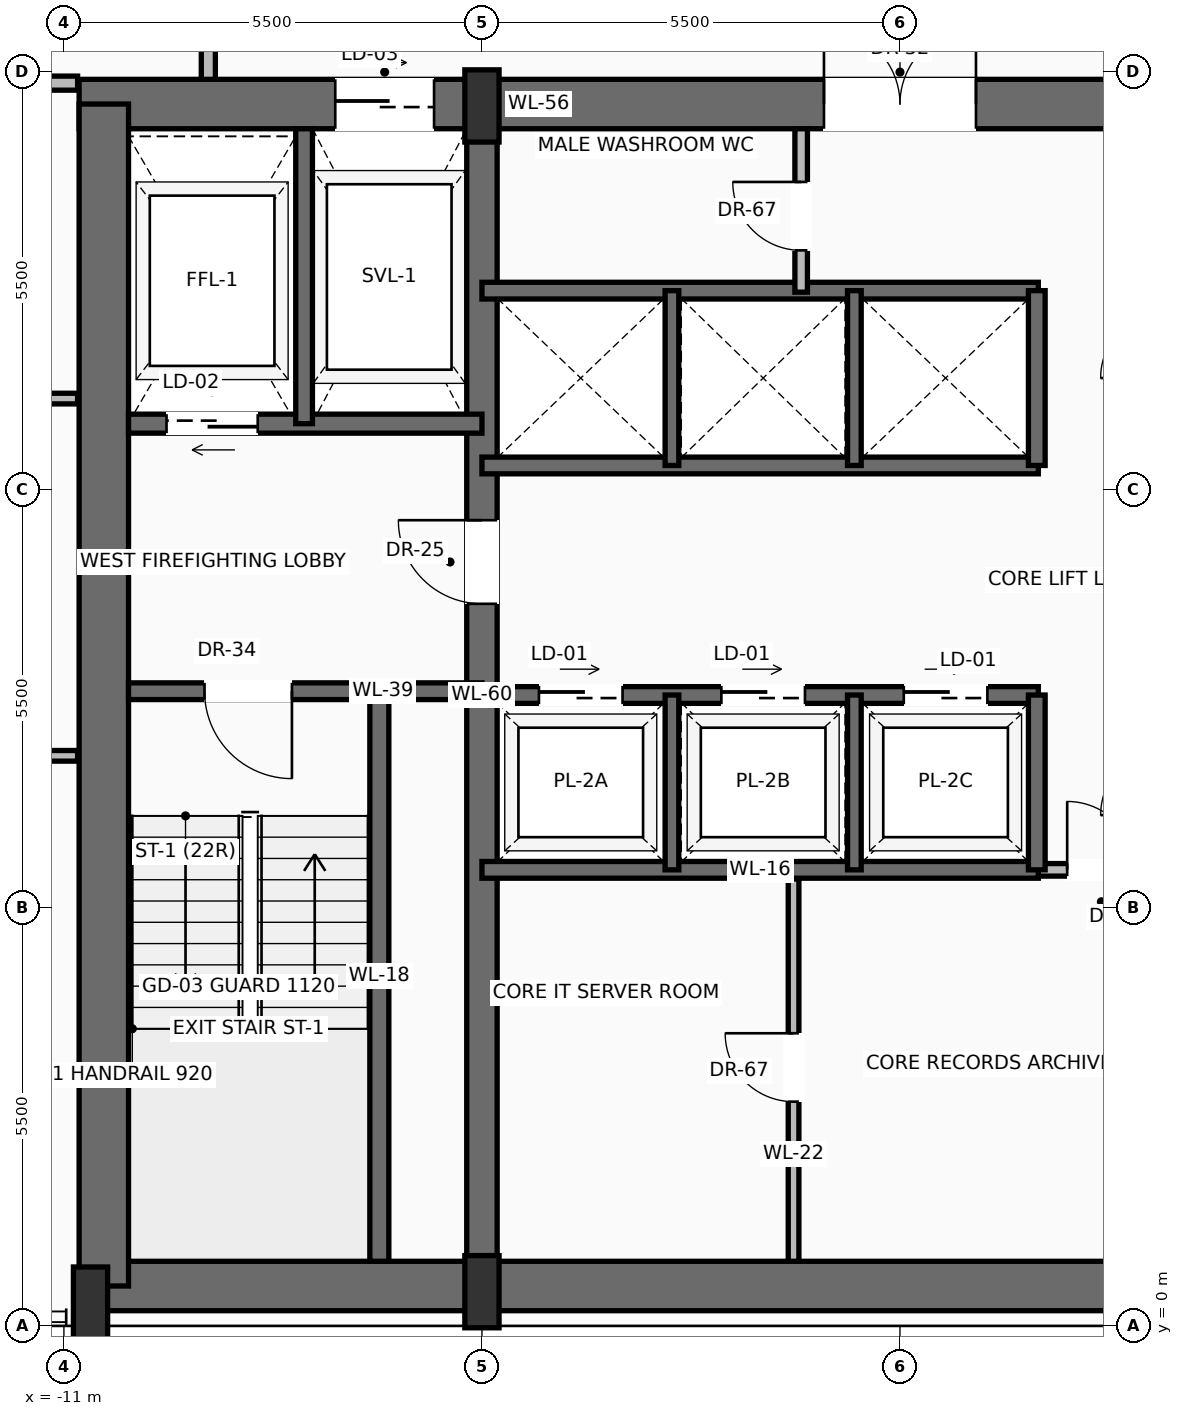
"""IFC4 building model, lengths in metres.
Left out: names, types, materials, properties, quantities, classifications, styles, units other than length and angle.
Written with IfcOpenShell. Run it as: python <this file> out.ifc"""

import sys

from ifc_helpers import new_model, si_unit, direction, frame, frame_2d, origin, origin_2d, place, context, subcontext, project, spatial, rectangle, extrude, source, transform, mapped, element, fill, save


model = new_model("IFC4")
c1 = context("Model", 3, precision=1e-05, world=origin(), true_north=direction((0.0, 1.0)))
c2 = subcontext(c1, "Body", "Model", "MODEL_VIEW")
j1 = project(units=[si_unit("LENGTHUNIT", "METRE"), si_unit("PLANEANGLEUNIT", "RADIAN")], contexts=[c1])
p1 = place(None, origin())
s1 = spatial("IfcSite", under=j1, at=p1, CompositionType="ELEMENT")
p2 = place(p1, origin())
s2 = spatial("IfcBuilding", under=s1, at=p2, CompositionType="ELEMENT")
p3 = place(p2, frame((0.0, 0.0, 151.5)))
s3 = spatial("IfcBuildingStorey", under=s2, at=p3, CompositionType="ELEMENT", Elevation=151.5)
p4 = place(p3, frame((-10.65, 0.525, 0.0), z_axis=(0.0, 0.0, 1.0), x_axis=(1.0, 0.0, 0.0)))
e1 = element("IfcWall", 1, at=p4, inside=s3, PredefinedType="SHEAR", context=c2, shape_type="SweptSolid", body=[
    extrude(rectangle(XDim=21.3, YDim=0.65, at=frame_2d((10.65, 0.0))), origin(), (0.0, 0.0, 1.0), 3.47),
])
p5 = place(p3, frame((-10.8, 16.075, 0.0), z_axis=(0.0, 0.0, 1.0), x_axis=(1.0, 0.0, 0.0)))
e2 = element("IfcWall", 2, at=p5, inside=s3, PredefinedType="SHEAR", context=c2, shape_type="SweptSolid", body=[
    extrude(rectangle(XDim=21.6, YDim=0.65, at=frame_2d((10.8, 0.0))), origin(), (0.0, 0.0, 1.0), 3.47),
])
p6 = place(p5, frame((3.37, 0.0, 0.0)))
e3 = element("IfcOpeningElement", 3, at=p6, cuts=e2, PredefinedType="OPENING", context=c2, shape_type="SweptSolid", body=[
    extrude(rectangle(XDim=1.3, YDim=2.3, at=frame_2d((0.65, 1.15))), frame((0.0, 0.335, 0.0), z_axis=(0.0, -1.0, 0.0), x_axis=(1.0, 0.0, 0.0)), (0.0, 0.0, 1.0), 0.67),
])
p7 = place(p5, frame((9.8, 0.0, 0.0)))
e4 = element("IfcOpeningElement", 4, at=p7, cuts=e2, PredefinedType="OPENING", context=c2, shape_type="SweptSolid", body=[
    extrude(rectangle(XDim=2.0, YDim=2.4, at=frame_2d((1.0, 1.2))), frame((0.0, 0.335, 0.0), z_axis=(0.0, -1.0, 0.0), x_axis=(1.0, 0.0, 0.0)), (0.0, 0.0, 1.0), 0.67),
])
p8 = place(p3, frame((-10.475, 0.525, 0.0), z_axis=(0.0, 0.0, 1.0), x_axis=(0.0, 1.0, 0.0)))
e5 = element("IfcWall", 5, at=p8, inside=s3, PredefinedType="SHEAR", context=c2, shape_type="SweptSolid", body=[
    extrude(rectangle(XDim=15.55, YDim=0.65, at=frame_2d((7.775, 0.0))), origin(), (0.0, 0.0, 1.0), 3.47),
])
p9 = place(p3, frame((-5.5, 0.525, 0.0), z_axis=(0.0, 0.0, 1.0), x_axis=(0.0, 1.0, 0.0)))
e6 = element("IfcWall", 6, at=p9, inside=s3, PredefinedType="SHEAR", context=c2, shape_type="SweptSolid", body=[
    extrude(rectangle(XDim=15.55, YDim=0.4, at=frame_2d((7.775, 0.0))), origin(), (0.0, 0.0, 1.0), 3.47),
])
p10 = place(p9, frame((8.975, 0.0, 0.0)))
e7 = element("IfcOpeningElement", 7, at=p10, cuts=e6, PredefinedType="OPENING", context=c2, shape_type="SweptSolid", body=[
    extrude(rectangle(XDim=1.1, YDim=2.2, at=frame_2d((0.55, 1.1))), frame((0.0, 0.21, 0.0), z_axis=(0.0, -1.0, 0.0), x_axis=(1.0, 0.0, 0.0)), (0.0, 0.0, 1.0), 0.42),
])
m1 = source(origin(), c2, "Body", "SweptSolid", [
    extrude(rectangle(XDim=0.45, YDim=0.95, at=origin_2d()), origin(), (0.0, 0.0, 1.0), 3.7),
])
for number, where, z_axis, x_axis in (
    (8, (-10.65, 0.3, 0.0), (0.0, 0.0, 1.0), (1.0, 0.0, 0.0)),
    (9, (-5.5, 0.45, 0.0), (0.0, 0.0, 1.0), (1.0, 0.0, 0.0)),
    (10, (-5.5, 16.05, 0.0), (0.0, 0.0, 1.0), (1.0, 0.0, 0.0)),
):
    element("IfcColumn", number, at=place(p3, frame(where, z_axis=z_axis, x_axis=x_axis)), inside=s3, PredefinedType="PILASTER", context=c2, shape_type="MappedRepresentation", body=[
        mapped(m1, transform((0.0, 0.0, 0.0), scale=1.0)),
    ])
p11 = place(p3, frame((-6.85, 0.85, 0.0), z_axis=(0.0, 0.0, 1.0), x_axis=(0.0, 1.0, 0.0)))
e11 = element("IfcWall", 11, at=p11, inside=s3, PredefinedType="SOLIDWALL", context=c2, shape_type="SweptSolid", body=[
    extrude(rectangle(XDim=7.5, YDim=0.25, at=frame_2d((3.75, 0.0))), origin(), (0.0, 0.0, 1.0), 3.47),
])
p12 = place(p3, frame((-5.5, 8.35, 0.0), z_axis=(0.0, 0.0, 1.0), x_axis=(-1.0, 0.0, 0.0)))
e12 = element("IfcWall", 12, at=p12, inside=s3, PredefinedType="SOLIDWALL", context=c2, shape_type="SweptSolid", body=[
    extrude(rectangle(XDim=4.65, YDim=0.22, at=frame_2d((2.325, 0.0))), origin(), (0.0, 0.0, 1.0), 3.47),
])
p13 = place(p12, frame((2.5, 0.0, 0.0)))
e13 = element("IfcOpeningElement", 13, at=p13, cuts=e12, PredefinedType="OPENING", context=c2, shape_type="SweptSolid", body=[
    extrude(rectangle(XDim=1.15, YDim=2.2, at=frame_2d((0.575, 1.1))), frame((0.0, 0.12, 0.0), z_axis=(0.0, -1.0, 0.0), x_axis=(1.0, 0.0, 0.0)), (0.0, 0.0, 1.0), 0.24),
])
p14 = place(p3, frame((-5.5, 11.87, 0.0), z_axis=(0.0, 0.0, 1.0), x_axis=(-1.0, 0.0, 0.0)))
e14 = element("IfcWall", 14, at=p14, inside=s3, PredefinedType="SOLIDWALL", context=c2, shape_type="SweptSolid", body=[
    extrude(rectangle(XDim=4.65, YDim=0.25, at=frame_2d((2.325, 0.0))), origin(), (0.0, 0.0, 1.0), 3.47),
])
p15 = place(p14, frame((2.95, 0.0, 0.0)))
e15 = element("IfcOpeningElement", 15, at=p15, cuts=e14, PredefinedType="OPENING", context=c2, shape_type="SweptSolid", body=[
    extrude(rectangle(XDim=1.2, YDim=2.25, at=frame_2d((0.6, 1.125))), frame((0.0, 0.135, 0.0), z_axis=(0.0, -1.0, 0.0), x_axis=(1.0, 0.0, 0.0)), (0.0, 0.0, 1.0), 0.27),
])
p16 = place(p3, frame((-7.84, 11.87, 0.0), z_axis=(0.0, 0.0, 1.0), x_axis=(0.0, 1.0, 0.0)))
e16 = element("IfcWall", 16, at=p16, inside=s3, PredefinedType="SOLIDWALL", context=c2, shape_type="SweptSolid", body=[
    extrude(rectangle(XDim=3.88, YDim=0.22, at=frame_2d((1.94, 0.0))), origin(), (0.0, 0.0, 1.0), 3.47),
])
p17 = place(p3, frame((1.82, 6.0, 0.0), z_axis=(0.0, 0.0, 1.0), x_axis=(1.0, 0.0, 0.0)))
e17 = element("IfcWall", 17, at=p17, inside=s3, PredefinedType="PARTITIONING", context=c2, shape_type="SweptSolid", body=[
    extrude(rectangle(XDim=3.48, YDim=0.165, at=frame_2d((1.74, 0.0))), origin(), (0.0, 0.0, 1.0), 3.462),
])
p18 = place(p17, frame((0.38, 0.0, 0.0)))
e18 = element("IfcOpeningElement", 18, at=p18, cuts=e17, PredefinedType="OPENING", context=c2, shape_type="SweptSolid", body=[
    extrude(rectangle(XDim=0.9, YDim=2.1, at=frame_2d((0.45, 1.05))), frame((0.0, 0.093, 0.0), z_axis=(0.0, -1.0, 0.0), x_axis=(1.0, 0.0, 0.0)), (0.0, 0.0, 1.0), 0.185),
])
p19 = place(p3, frame((-1.4, 0.85, 0.0), z_axis=(0.0, 0.0, 1.0), x_axis=(0.0, 1.0, 0.0)))
e19 = element("IfcWall", 19, at=p19, inside=s3, PredefinedType="PARTITIONING", context=c2, shape_type="SweptSolid", body=[
    extrude(rectangle(XDim=5.03, YDim=0.14, at=frame_2d((2.515, 0.0))), origin(), (0.0, 0.0, 1.0), 3.462),
])
p20 = place(p19, frame((2.1, 0.0, 0.0)))
e20 = element("IfcOpeningElement", 20, at=p20, cuts=e19, PredefinedType="OPENING", context=c2, shape_type="SweptSolid", body=[
    extrude(rectangle(XDim=0.9, YDim=2.1, at=frame_2d((0.45, 1.05))), frame((0.0, 0.08, 0.0), z_axis=(0.0, -1.0, 0.0), x_axis=(1.0, 0.0, 0.0)), (0.0, 0.0, 1.0), 0.16),
])
p21 = place(p3, frame((-5.5, 6.0, 0.0), z_axis=(0.0, 0.0, 1.0), x_axis=(1.0, 0.0, 0.0)))
e21 = element("IfcWall", 21, at=p21, inside=s3, PredefinedType="SOLIDWALL", context=c2, shape_type="SweptSolid", body=[
    extrude(rectangle(XDim=7.32, YDim=0.22, at=frame_2d((3.66, 0.0))), origin(), (0.0, 0.0, 1.0), 3.47),
])
p22 = place(p3, frame((-5.5, 8.3, 0.0), z_axis=(0.0, 0.0, 1.0), x_axis=(1.0, 0.0, 0.0)))
e22 = element("IfcWall", 22, at=p22, inside=s3, PredefinedType="SOLIDWALL", context=c2, shape_type="SweptSolid", body=[
    extrude(rectangle(XDim=7.32, YDim=0.22, at=frame_2d((3.66, 0.0))), origin(), (0.0, 0.0, 1.0), 3.47),
])
p23 = place(p22, frame((0.75, 0.0, 0.0)))
e23 = element("IfcOpeningElement", 23, at=p23, cuts=e22, PredefinedType="OPENING", context=c2, shape_type="SweptSolid", body=[
    extrude(rectangle(XDim=1.1, YDim=2.2, at=frame_2d((0.55, 1.1))), frame((0.0, 0.12, 0.0), z_axis=(0.0, -1.0, 0.0), x_axis=(1.0, 0.0, 0.0)), (0.0, 0.0, 1.0), 0.24),
])
p24 = place(p22, frame((3.15, 0.0, 0.0)))
e24 = element("IfcOpeningElement", 24, at=p24, cuts=e22, PredefinedType="OPENING", context=c2, shape_type="SweptSolid", body=[
    extrude(rectangle(XDim=1.1, YDim=2.2, at=frame_2d((0.55, 1.1))), frame((0.0, 0.12, 0.0), z_axis=(0.0, -1.0, 0.0), x_axis=(1.0, 0.0, 0.0)), (0.0, 0.0, 1.0), 0.24),
])
p25 = place(p22, frame((5.55, 0.0, 0.0)))
e25 = element("IfcOpeningElement", 25, at=p25, cuts=e22, PredefinedType="OPENING", context=c2, shape_type="SweptSolid", body=[
    extrude(rectangle(XDim=1.1, YDim=2.2, at=frame_2d((0.55, 1.1))), frame((0.0, 0.12, 0.0), z_axis=(0.0, -1.0, 0.0), x_axis=(1.0, 0.0, 0.0)), (0.0, 0.0, 1.0), 0.24),
])
p26 = place(p3, frame((1.8, 6.0, 0.0), z_axis=(0.0, 0.0, 1.0), x_axis=(0.0, 1.0, 0.0)))
e26 = element("IfcWall", 26, at=p26, inside=s3, PredefinedType="SOLIDWALL", context=c2, shape_type="SweptSolid", body=[
    extrude(rectangle(XDim=2.3, YDim=0.22, at=frame_2d((1.15, 0.0))), origin(), (0.0, 0.0, 1.0), 3.47),
])
for number, where, z_axis, x_axis in (
    (27, (-3.0, 6.0, 0.0), (0.0, 0.0, 1.0), (0.0, 1.0, 0.0)),
    (28, (-0.6, 6.0, 0.0), (0.0, 0.0, 1.0), (0.0, 1.0, 0.0)),
):
    element("IfcWall", number, at=place(p3, frame(where, z_axis=z_axis, x_axis=x_axis)), inside=s3, PredefinedType="SOLIDWALL", context=c2, shape_type="SweptSolid", body=[
        extrude(rectangle(XDim=2.3, YDim=0.18, at=frame_2d((1.15, 0.0))), origin(), (0.0, 0.0, 1.0), 3.47),
    ])
for number, where, z_axis, x_axis in (
    (29, (-5.5, 11.32, 0.0), (0.0, 0.0, 1.0), (1.0, 0.0, 0.0)),
    (30, (-5.5, 13.62, 0.0), (0.0, 0.0, 1.0), (1.0, 0.0, 0.0)),
):
    element("IfcWall", number, at=place(p3, frame(where, z_axis=z_axis, x_axis=x_axis)), inside=s3, PredefinedType="SOLIDWALL", context=c2, shape_type="SweptSolid", body=[
        extrude(rectangle(XDim=7.32, YDim=0.22, at=frame_2d((3.66, 0.0))), origin(), (0.0, 0.0, 1.0), 3.47),
    ])
p27 = place(p3, frame((1.8, 11.32, 0.0), z_axis=(0.0, 0.0, 1.0), x_axis=(0.0, 1.0, 0.0)))
e31 = element("IfcWall", 31, at=p27, inside=s3, PredefinedType="SOLIDWALL", context=c2, shape_type="SweptSolid", body=[
    extrude(rectangle(XDim=2.3, YDim=0.22, at=frame_2d((1.15, 0.0))), origin(), (0.0, 0.0, 1.0), 3.47),
])
for number, where, z_axis, x_axis in (
    (32, (-3.0, 11.32, 0.0), (0.0, 0.0, 1.0), (0.0, 1.0, 0.0)),
    (33, (-0.6, 11.32, 0.0), (0.0, 0.0, 1.0), (0.0, 1.0, 0.0)),
):
    element("IfcWall", number, at=place(p3, frame(where, z_axis=z_axis, x_axis=x_axis)), inside=s3, PredefinedType="SOLIDWALL", context=c2, shape_type="SweptSolid", body=[
        extrude(rectangle(XDim=2.3, YDim=0.18, at=frame_2d((1.15, 0.0))), origin(), (0.0, 0.0, 1.0), 3.47),
    ])
p28 = place(p3, frame((-1.3, 13.6, 0.0), z_axis=(0.0, 0.0, 1.0), x_axis=(0.0, 1.0, 0.0)))
e34 = element("IfcWall", 34, at=p28, inside=s3, PredefinedType="PARTITIONING", context=c2, shape_type="SweptSolid", body=[
    extrude(rectangle(XDim=2.15, YDim=0.165, at=frame_2d((1.075, 0.0))), origin(), (0.0, 0.0, 1.0), 3.462),
])
p29 = place(p28, frame((0.55, 0.0, 0.0)))
e35 = element("IfcOpeningElement", 35, at=p29, cuts=e34, PredefinedType="OPENING", context=c2, shape_type="SweptSolid", body=[
    extrude(rectangle(XDim=0.9, YDim=2.1, at=frame_2d((0.45, 1.05))), frame((0.0, 0.093, 0.0), z_axis=(0.0, -1.0, 0.0), x_axis=(1.0, 0.0, 0.0)), (0.0, 0.0, 1.0), 0.185),
])
p30 = place(p3, frame((-9.1, 16.4, 0.0), z_axis=(0.0, 0.0, 1.0), x_axis=(0.0, 1.0, 0.0)))
e36 = element("IfcWall", 36, at=p30, inside=s3, PredefinedType="PARTITIONING", context=c2, shape_type="SweptSolid", body=[
    extrude(rectangle(XDim=8.8, YDim=0.185, at=frame_2d((4.4, 0.0))), origin(), (0.0, 0.0, 1.0), 2.846),
])
p31 = place(p30, frame((3.903, 0.0, 0.0)))
e37 = element("IfcOpeningElement", 37, at=p31, cuts=e36, PredefinedType="OPENING", context=c2, shape_type="SweptSolid", body=[
    extrude(rectangle(XDim=0.95, YDim=2.2, at=frame_2d((0.475, 1.1))), frame((0.0, 0.103, 0.0), z_axis=(0.0, -1.0, 0.0), x_axis=(1.0, 0.0, 0.0)), (0.0, 0.0, 1.0), 0.205),
])
p32 = place(p30, frame((1.487, 0.0, 0.0)))
e38 = element("IfcOpeningElement", 38, at=p32, cuts=e36, PredefinedType="OPENING", context=c2, shape_type="SweptSolid", body=[
    extrude(rectangle(XDim=0.95, YDim=2.2, at=frame_2d((0.475, 1.1))), frame((0.0, 0.103, 0.0), z_axis=(0.0, -1.0, 0.0), x_axis=(1.0, 0.0, 0.0)), (0.0, 0.0, 1.0), 0.205),
])
p33 = place(p3, frame((-21.38, 16.35, 0.0), z_axis=(0.0, 0.0, 1.0), x_axis=(1.0, 0.0, 0.0)))
e39 = element("IfcWall", 39, at=p33, inside=s3, PredefinedType="PARTITIONING", context=c2, shape_type="SweptSolid", body=[
    extrude(rectangle(XDim=10.56, YDim=0.185, at=frame_2d((5.28, 0.0))), origin(), (0.0, 0.0, 1.0), 3.462),
])
p34 = place(p33, frame((6.287, 0.0, 0.0)))
e40 = element("IfcOpeningElement", 40, at=p34, cuts=e39, PredefinedType="OPENING", context=c2, shape_type="SweptSolid", body=[
    extrude(rectangle(XDim=0.95, YDim=2.2, at=frame_2d((0.475, 1.1))), frame((0.0, 0.103, 0.0), z_axis=(0.0, -1.0, 0.0), x_axis=(1.0, 0.0, 0.0)), (0.0, 0.0, 1.0), 0.205),
])
p35 = place(p3, frame((-27.076, 7.5, 0.0), z_axis=(0.0, 0.0, 1.0), x_axis=(1.0, 0.0, 0.0)))
e41 = element("IfcWall", 41, at=p35, inside=s3, PredefinedType="PARTITIONING", context=c2, shape_type="SweptSolid", body=[
    extrude(rectangle(XDim=16.256, YDim=0.14, at=frame_2d((8.128, 0.0))), origin(), (0.0, 0.0, 1.0), 3.462),
])
p36 = place(p35, frame((7.662, 0.0, 0.0)))
e42 = element("IfcOpeningElement", 42, at=p36, cuts=e41, PredefinedType="OPENING", context=c2, shape_type="SweptSolid", body=[
    extrude(rectangle(XDim=0.95, YDim=2.2, at=frame_2d((0.475, 1.1))), frame((0.0, 0.08, 0.0), z_axis=(0.0, -1.0, 0.0), x_axis=(1.0, 0.0, 0.0)), (0.0, 0.0, 1.0), 0.16),
])
p37 = place(p3, frame((-24.051, 12.2, 0.0), z_axis=(0.0, 0.0, 1.0), x_axis=(1.0, 0.0, 0.0)))
e43 = element("IfcWall", 43, at=p37, inside=s3, PredefinedType="PARTITIONING", context=c2, shape_type="SweptSolid", body=[
    extrude(rectangle(XDim=13.231, YDim=0.14, at=frame_2d((6.615, 0.0))), origin(), (0.0, 0.0, 1.0), 3.462),
])
p38 = place(p37, frame((6.149, 0.0, 0.0)))
e44 = element("IfcOpeningElement", 44, at=p38, cuts=e43, PredefinedType="OPENING", context=c2, shape_type="SweptSolid", body=[
    extrude(rectangle(XDim=0.95, YDim=2.2, at=frame_2d((0.475, 1.1))), frame((0.0, 0.08, 0.0), z_axis=(0.0, -1.0, 0.0), x_axis=(1.0, 0.0, 0.0)), (0.0, 0.0, 1.0), 0.16),
])
m2 = source(origin(), c2, "Body", "SweptSolid", [
    extrude(rectangle(XDim=1.15, YDim=2.2, at=frame_2d((0.575, 1.1))), frame((0.0, 0.025, 0.0), z_axis=(0.0, -1.0, 0.0), x_axis=(1.0, 0.0, 0.0)), (0.0, 0.0, 1.0), 0.05),
])
p39 = place(p13, origin())
e45 = element("IfcDoor", 45, at=p39, inside=s3, OperationType="SINGLE_SWING_LEFT", PredefinedType="DOOR", context=c2, shape_type="MappedRepresentation", body=[
    mapped(m2, transform((0.0, 0.0, 0.0), scale=1.0)),
])
fill(e13, e45)
m3 = source(origin(), c2, "Body", "SweptSolid", [
    extrude(rectangle(XDim=1.1, YDim=2.2, at=frame_2d((0.55, 1.1))), frame((0.0, 0.025, 0.0), z_axis=(0.0, -1.0, 0.0), x_axis=(1.0, 0.0, 0.0)), (0.0, 0.0, 1.0), 0.05),
])
p40 = place(p10, origin())
e46 = element("IfcDoor", 46, at=p40, inside=s3, OperationType="SINGLE_SWING_RIGHT", PredefinedType="DOOR", context=c2, shape_type="MappedRepresentation", body=[
    mapped(m3, transform((0.0, 0.0, 0.0), scale=1.0)),
])
fill(e7, e46)
m4 = source(origin(), c2, "Body", "SweptSolid", [
    extrude(rectangle(XDim=1.2, YDim=2.25, at=frame_2d((0.6, 1.125))), frame((0.0, 0.025, 0.0), z_axis=(0.0, -1.0, 0.0), x_axis=(1.0, 0.0, 0.0)), (0.0, 0.0, 1.0), 0.05),
])
p41 = place(p15, origin())
e47 = element("IfcDoor", 47, at=p41, inside=s3, OperationType="SLIDING_TO_LEFT", PredefinedType="DOOR", context=c2, shape_type="MappedRepresentation", body=[
    mapped(m4, transform((0.0, 0.0, 0.0), scale=1.0)),
])
fill(e15, e47)
m5 = source(origin(), c2, "Body", "SweptSolid", [
    extrude(rectangle(XDim=1.3, YDim=2.3, at=frame_2d((0.65, 1.15))), frame((0.0, 0.025, 0.0), z_axis=(0.0, -1.0, 0.0), x_axis=(1.0, 0.0, 0.0)), (0.0, 0.0, 1.0), 0.05),
])
p42 = place(p6, origin())
e48 = element("IfcDoor", 48, at=p42, inside=s3, OperationType="SLIDING_TO_RIGHT", PredefinedType="DOOR", context=c2, shape_type="MappedRepresentation", body=[
    mapped(m5, transform((0.0, 0.0, 0.0), scale=1.0)),
])
fill(e3, e48)
m6 = source(origin(), c2, "Body", "SweptSolid", [
    extrude(rectangle(XDim=2.0, YDim=2.4, at=frame_2d((1.0, 1.2))), frame((0.0, 0.025, 0.0), z_axis=(0.0, -1.0, 0.0), x_axis=(1.0, 0.0, 0.0)), (0.0, 0.0, 1.0), 0.05),
])
p43 = place(p7, origin())
e49 = element("IfcDoor", 49, at=p43, inside=s3, OperationType="DOUBLE_DOOR_SINGLE_SWING", PredefinedType="DOOR", context=c2, shape_type="MappedRepresentation", body=[
    mapped(m6, transform((0.0, 0.0, 0.0), scale=1.0)),
])
fill(e4, e49)
m7 = source(origin(), c2, "Body", "SweptSolid", [
    extrude(rectangle(XDim=0.9, YDim=2.1, at=frame_2d((0.45, 1.05))), frame((0.0, 0.025, 0.0), z_axis=(0.0, -1.0, 0.0), x_axis=(1.0, 0.0, 0.0)), (0.0, 0.0, 1.0), 0.05),
])
p44 = place(p18, origin())
e50 = element("IfcDoor", 50, at=p44, inside=s3, OperationType="SINGLE_SWING_LEFT", PredefinedType="DOOR", context=c2, shape_type="MappedRepresentation", body=[
    mapped(m7, transform((0.0, 0.0, 0.0), scale=1.0)),
])
fill(e18, e50)
p45 = place(p20, origin())
e51 = element("IfcDoor", 51, at=p45, inside=s3, OperationType="SINGLE_SWING_RIGHT", PredefinedType="DOOR", context=c2, shape_type="MappedRepresentation", body=[
    mapped(m7, transform((0.0, 0.0, 0.0), scale=1.0)),
])
fill(e20, e51)
m8 = source(origin(), c2, "Body", "SweptSolid", [
    extrude(rectangle(XDim=1.1, YDim=2.2, at=frame_2d((0.55, 1.1))), frame((0.0, 0.025, 0.0), z_axis=(0.0, -1.0, 0.0), x_axis=(1.0, 0.0, 0.0)), (0.0, 0.0, 1.0), 0.05),
])
p46 = place(p23, origin())
e52 = element("IfcDoor", 52, at=p46, inside=s3, OperationType="SLIDING_TO_LEFT", PredefinedType="DOOR", context=c2, shape_type="MappedRepresentation", body=[
    mapped(m8, transform((0.0, 0.0, 0.0), scale=1.0)),
])
fill(e23, e52)
p47 = place(p24, origin())
e53 = element("IfcDoor", 53, at=p47, inside=s3, OperationType="SLIDING_TO_LEFT", PredefinedType="DOOR", context=c2, shape_type="MappedRepresentation", body=[
    mapped(m8, transform((0.0, 0.0, 0.0), scale=1.0)),
])
fill(e24, e53)
p48 = place(p25, origin())
e54 = element("IfcDoor", 54, at=p48, inside=s3, OperationType="SLIDING_TO_LEFT", PredefinedType="DOOR", context=c2, shape_type="MappedRepresentation", body=[
    mapped(m8, transform((0.0, 0.0, 0.0), scale=1.0)),
])
fill(e25, e54)
p49 = place(p29, origin())
e55 = element("IfcDoor", 55, at=p49, inside=s3, OperationType="SINGLE_SWING_RIGHT", PredefinedType="DOOR", context=c2, shape_type="MappedRepresentation", body=[
    mapped(m7, transform((0.0, 0.0, 0.0), scale=1.0)),
])
fill(e35, e55)
save(model, sys.argv[1])
